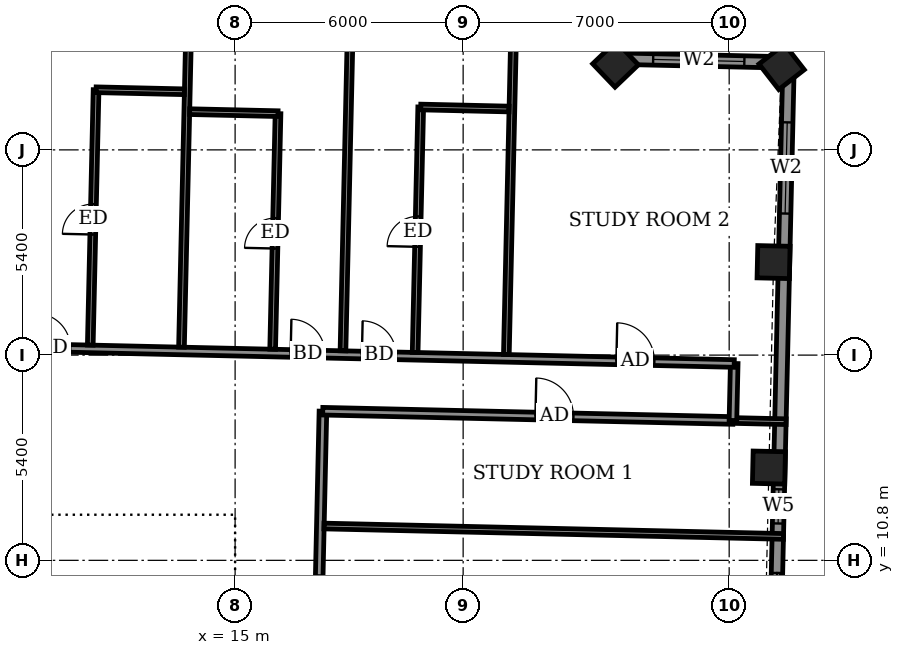
"""IFC4 building model, lengths in metres.
Left out: names, types, materials, properties, quantities, classifications, styles, units other than length and angle.
Written with IfcOpenShell. Run it as: python <this file> out.ifc"""

import sys

from ifc_helpers import new_model, si_unit, direction, frame, frame_2d, origin, origin_2d, place, context, subcontext, project, spatial, rectangle, extrude, element, fill, save


model = new_model("IFC4")
c1 = context("Model", 3, precision=1e-05, world=origin(), true_north=direction((0.0, 1.0)))
c2 = subcontext(c1, "Body", "Model", "MODEL_VIEW")
j1 = project(units=[si_unit("LENGTHUNIT", "METRE"), si_unit("PLANEANGLEUNIT", "RADIAN")], contexts=[c1])
p1 = place(None, origin())
s1 = spatial("IfcSite", under=j1, at=p1, CompositionType="ELEMENT")
p2 = place(p1, origin())
s2 = spatial("IfcBuilding", under=s1, at=p2, CompositionType="ELEMENT")
p3 = place(p2, frame((0.0, 0.0, 316.9)))
s3 = spatial("IfcBuildingStorey", under=s2, at=p3, CompositionType="ELEMENT", Elevation=316.9)
for number, where, z_axis, x_axis in (
    (1, (29.046, 13.242, -0.55), (0.0, 0.0, 1.0), (0.023, 1.0, 0.0)),
    (2, (29.168, 18.648, -0.55), (0.0, 0.0, 1.0), (0.023, 1.0, 0.0)),
    (3, (29.38, 23.784, -0.55), (0.0, 0.0, 1.0), (-0.613, 0.79, 0.0)),
    (4, (25.01, 23.851, -0.55), (0.0, 0.0, 1.0), (-0.691, 0.723, 0.0)),
):
    element("IfcColumn", number, at=place(p3, frame(where, z_axis=z_axis, x_axis=x_axis)), inside=s3, PredefinedType="COLUMN", context=c2, shape_type="SweptSolid", body=[
        extrude(rectangle(XDim=0.85, YDim=0.85, at=origin_2d()), origin(), (0.0, 0.0, 1.0), 3.6),
    ])
p4 = place(p3, frame((29.188, 7.404, 0.0), z_axis=(0.0, 0.0, 1.0), x_axis=(0.022728463996, 0.999741675096, 0.0)))
e5 = element("IfcWall", 5, at=p4, inside=s3, PredefinedType="SOLIDWALL", context=c2, shape_type="SweptSolid", body=[
    extrude(rectangle(XDim=16.499, YDim=0.3, at=frame_2d((8.25, 0.0))), origin(), (0.0, 0.0, 1.0), 2.55),
])
p5 = place(p4, frame((1.563, 0.0, 0.0)))
e6 = element("IfcOpeningElement", 6, at=p5, cuts=e5, PredefinedType="OPENING", context=c2, shape_type="SweptSolid", body=[
    extrude(rectangle(XDim=1.5, YDim=2.4, at=frame_2d((0.75, 1.2))), frame((0.0, 0.16, 0.0), z_axis=(0.0, -1.0, 0.0), x_axis=(1.0, 0.0, 0.0)), (0.0, 0.0, 1.0), 0.32),
])
p6 = place(p4, frame((4.367, 0.0, 0.9)))
e7 = element("IfcOpeningElement", 7, at=p6, cuts=e5, PredefinedType="OPENING", context=c2, shape_type="SweptSolid", body=[
    extrude(rectangle(XDim=0.9, YDim=1.5, at=frame_2d((0.45, 0.75))), frame((0.0, 0.16, 0.0), z_axis=(0.0, -1.0, 0.0), x_axis=(1.0, 0.0, 0.0)), (0.0, 0.0, 1.0), 0.32),
])
p7 = place(p4, frame((12.524, 0.0, 0.9)))
e8 = element("IfcOpeningElement", 8, at=p7, cuts=e5, PredefinedType="OPENING", context=c2, shape_type="SweptSolid", body=[
    extrude(rectangle(XDim=2.4, YDim=1.5, at=frame_2d((1.2, 0.75))), frame((0.0, 0.16, 0.0), z_axis=(0.0, -1.0, 0.0), x_axis=(1.0, 0.0, 0.0)), (0.0, 0.0, 1.0), 0.32),
])
p8 = place(p3, frame((29.563, 23.899, 0.0), z_axis=(0.0, 0.0, 1.0), x_axis=(-0.999741204967, 0.022749133868, 0.0)))
e9 = element("IfcWall", 9, at=p8, inside=s3, PredefinedType="SOLIDWALL", context=c2, shape_type="SweptSolid", body=[
    extrude(rectangle(XDim=4.4, YDim=0.3, at=frame_2d((2.2, 0.0))), origin(), (0.0, 0.0, 1.0), 2.55),
])
p9 = place(p8, frame((1.164, 0.0, 0.9)))
e10 = element("IfcOpeningElement", 10, at=p9, cuts=e9, PredefinedType="OPENING", context=c2, shape_type="SweptSolid", body=[
    extrude(rectangle(XDim=2.4, YDim=1.5, at=frame_2d((1.2, 0.75))), frame((0.0, 0.16, 0.0), z_axis=(0.0, -1.0, 0.0), x_axis=(1.0, 0.0, 0.0)), (0.0, 0.0, 1.0), 0.32),
])
p10 = place(p3, frame((25.164, 23.999, 0.0), z_axis=(0.0, 0.0, 1.0), x_axis=(0.02269871331, 0.999742351016, 0.0)))
e11 = element("IfcWall", 11, at=p10, inside=s3, PredefinedType="SOLIDWALL", context=c2, shape_type="SweptSolid", body=[
    extrude(rectangle(XDim=4.399, YDim=0.3, at=frame_2d((2.2, 0.0))), origin(), (0.0, 0.0, 1.0), 2.55),
])
p11 = place(p10, frame((0.826, 0.0, 0.9)))
e12 = element("IfcOpeningElement", 12, at=p11, cuts=e11, PredefinedType="OPENING", context=c2, shape_type="SweptSolid", body=[
    extrude(rectangle(XDim=2.4, YDim=1.5, at=frame_2d((1.2, 0.75))), frame((0.0, 0.16, 0.0), z_axis=(0.0, -1.0, 0.0), x_axis=(1.0, 0.0, 0.0)), (0.0, 0.0, 1.0), 0.32),
])
p12 = place(p3, frame((17.157, 7.898, 0.0), z_axis=(0.0, 0.0, 1.0), x_axis=(0.022562209343, 0.999745440955, 0.0)))
e13 = element("IfcWall", 13, at=p12, inside=s3, PredefinedType="PARTITIONING", context=c2, shape_type="SweptSolid", body=[
    extrude(rectangle(XDim=6.828, YDim=0.2, at=frame_2d((3.414, 0.0))), origin(), (0.0, 0.0, 1.0), 3.05),
])
p13 = place(p12, frame((1.504, 0.0, 0.0)))
e14 = element("IfcOpeningElement", 14, at=p13, cuts=e13, PredefinedType="OPENING", context=c2, shape_type="SweptSolid", body=[
    extrude(rectangle(XDim=1.0, YDim=2.1, at=frame_2d((0.5, 1.05))), frame((0.0, 0.11, 0.0), z_axis=(0.0, -1.0, 0.0), x_axis=(1.0, 0.0, 0.0)), (0.0, 0.0, 1.0), 0.22),
])
p14 = place(p3, frame((17.338, 11.703, 0.0), z_axis=(0.0, 0.0, 1.0), x_axis=(0.999743510562, -0.022647584624, 0.0)))
e15 = element("IfcWall", 15, at=p14, inside=s3, PredefinedType="PARTITIONING", context=c2, shape_type="SweptSolid", body=[
    extrude(rectangle(XDim=12.095, YDim=0.15, at=frame_2d((6.048, 0.0))), origin(), (0.0, 0.0, 1.0), 2.55),
])
p15 = place(p3, frame((17.306, 14.724, 0.0), z_axis=(0.0, 0.0, 1.0), x_axis=(0.999744269809, -0.022614043969, 0.0)))
e16 = element("IfcWall", 16, at=p15, inside=s3, PredefinedType="PARTITIONING", context=c2, shape_type="SweptSolid", body=[
    extrude(rectangle(XDim=10.796, YDim=0.2, at=frame_2d((5.398, 0.0))), origin(), (0.0, 0.0, 1.0), 3.05),
])
p16 = place(p15, frame((5.598, 0.0, 0.0)))
e17 = element("IfcOpeningElement", 17, at=p16, cuts=e16, PredefinedType="OPENING", context=c2, shape_type="SweptSolid", body=[
    extrude(rectangle(XDim=1.0, YDim=2.1, at=frame_2d((0.5, 1.05))), frame((0.0, 0.11, 0.0), z_axis=(0.0, -1.0, 0.0), x_axis=(1.0, 0.0, 0.0)), (0.0, 0.0, 1.0), 0.22),
])
p17 = place(p3, frame((28.099, 14.48, 0.0), z_axis=(0.0, 0.0, 1.0), x_axis=(0.999738763928, -0.022856156732, 0.0)))
e18 = element("IfcWall", 18, at=p17, inside=s3, PredefinedType="PARTITIONING", context=c2, shape_type="SweptSolid", body=[
    extrude(rectangle(XDim=1.399, YDim=0.15, at=frame_2d((0.7, 0.0))), origin(), (0.0, 0.0, 1.0), 2.55),
])
p18 = place(p3, frame((28.099, 14.48, 0.0), z_axis=(0.0, 0.0, 1.0), x_axis=(0.022632637625, 0.99974384905, 0.0)))
e19 = element("IfcWall", 19, at=p18, inside=s3, PredefinedType="PARTITIONING", context=c2, shape_type="SweptSolid", body=[
    extrude(rectangle(XDim=1.5, YDim=0.2, at=frame_2d((0.75, 0.0))), origin(), (0.0, 0.0, 1.0), 3.05),
])
p19 = place(p3, frame((-30.652, 17.313, 0.0), z_axis=(0.0, 0.0, 1.0), x_axis=(0.999742623764, -0.02268669719, 0.0)))
e20 = element("IfcWall", 20, at=p19, inside=s3, PredefinedType="PARTITIONING", context=c2, shape_type="SweptSolid", body=[
    extrude(rectangle(XDim=58.8, YDim=0.2, at=frame_2d((29.4, 0.0))), origin(), (0.0, 0.0, 1.0), 3.05),
])
p20 = place(p19, frame((55.698, 0.0, 0.0)))
e21 = element("IfcOpeningElement", 21, at=p20, cuts=e20, PredefinedType="OPENING", context=c2, shape_type="SweptSolid", body=[
    extrude(rectangle(XDim=1.0, YDim=2.1, at=frame_2d((0.5, 1.05))), frame((0.0, 0.11, 0.0), z_axis=(0.0, -1.0, 0.0), x_axis=(1.0, 0.0, 0.0)), (0.0, 0.0, 1.0), 0.22),
])
p21 = place(p19, frame((49.0, 0.0, 0.0)))
e22 = element("IfcOpeningElement", 22, at=p21, cuts=e20, PredefinedType="OPENING", context=c2, shape_type="SweptSolid", body=[
    extrude(rectangle(XDim=0.9, YDim=2.1, at=frame_2d((0.45, 1.05))), frame((0.0, 0.11, 0.0), z_axis=(0.0, -1.0, 0.0), x_axis=(1.0, 0.0, 0.0)), (0.0, 0.0, 1.0), 0.22),
])
p22 = place(p19, frame((47.125, 0.0, 0.0)))
e23 = element("IfcOpeningElement", 23, at=p22, cuts=e20, PredefinedType="OPENING", context=c2, shape_type="SweptSolid", body=[
    extrude(rectangle(XDim=0.9, YDim=2.1, at=frame_2d((0.45, 1.05))), frame((0.0, 0.11, 0.0), z_axis=(0.0, -1.0, 0.0), x_axis=(1.0, 0.0, 0.0)), (0.0, 0.0, 1.0), 0.22),
])
p23 = place(p19, frame((40.425, 0.0, 0.0)))
e24 = element("IfcOpeningElement", 24, at=p23, cuts=e20, PredefinedType="OPENING", context=c2, shape_type="SweptSolid", body=[
    extrude(rectangle(XDim=0.9, YDim=2.1, at=frame_2d((0.45, 1.05))), frame((0.0, 0.11, 0.0), z_axis=(0.0, -1.0, 0.0), x_axis=(1.0, 0.0, 0.0)), (0.0, 0.0, 1.0), 0.22),
])
p24 = place(p19, frame((38.4, 0.0, 0.0)))
e25 = element("IfcOpeningElement", 25, at=p24, cuts=e20, PredefinedType="OPENING", context=c2, shape_type="SweptSolid", body=[
    extrude(rectangle(XDim=0.9, YDim=2.1, at=frame_2d((0.45, 1.05))), frame((0.0, 0.11, 0.0), z_axis=(0.0, -1.0, 0.0), x_axis=(1.0, 0.0, 0.0)), (0.0, 0.0, 1.0), 0.22),
])
p25 = place(p19, frame((31.6, 0.0, 0.0)))
e26 = element("IfcOpeningElement", 26, at=p25, cuts=e20, PredefinedType="OPENING", context=c2, shape_type="SweptSolid", body=[
    extrude(rectangle(XDim=0.9, YDim=2.1, at=frame_2d((0.45, 1.05))), frame((0.0, 0.11, 0.0), z_axis=(0.0, -1.0, 0.0), x_axis=(1.0, 0.0, 0.0)), (0.0, 0.0, 1.0), 0.22),
])
p26 = place(p19, frame((29.55, 0.0, 0.0)))
e27 = element("IfcOpeningElement", 27, at=p26, cuts=e20, PredefinedType="OPENING", context=c2, shape_type="SweptSolid", body=[
    extrude(rectangle(XDim=0.9, YDim=2.1, at=frame_2d((0.45, 1.05))), frame((0.0, 0.11, 0.0), z_axis=(0.0, -1.0, 0.0), x_axis=(1.0, 0.0, 0.0)), (0.0, 0.0, 1.0), 0.22),
])
p27 = place(p19, frame((22.625, 0.0, 0.0)))
e28 = element("IfcOpeningElement", 28, at=p27, cuts=e20, PredefinedType="OPENING", context=c2, shape_type="SweptSolid", body=[
    extrude(rectangle(XDim=0.9, YDim=2.1, at=frame_2d((0.45, 1.05))), frame((0.0, 0.11, 0.0), z_axis=(0.0, -1.0, 0.0), x_axis=(1.0, 0.0, 0.0)), (0.0, 0.0, 1.0), 0.22),
])
p28 = place(p19, frame((20.625, 0.0, 0.0)))
e29 = element("IfcOpeningElement", 29, at=p28, cuts=e20, PredefinedType="OPENING", context=c2, shape_type="SweptSolid", body=[
    extrude(rectangle(XDim=0.9, YDim=2.1, at=frame_2d((0.45, 1.05))), frame((0.0, 0.11, 0.0), z_axis=(0.0, -1.0, 0.0), x_axis=(1.0, 0.0, 0.0)), (0.0, 0.0, 1.0), 0.22),
])
p29 = place(p19, frame((13.825, 0.0, 0.0)))
e30 = element("IfcOpeningElement", 30, at=p29, cuts=e20, PredefinedType="OPENING", context=c2, shape_type="SweptSolid", body=[
    extrude(rectangle(XDim=0.9, YDim=2.1, at=frame_2d((0.45, 1.05))), frame((0.0, 0.11, 0.0), z_axis=(0.0, -1.0, 0.0), x_axis=(1.0, 0.0, 0.0)), (0.0, 0.0, 1.0), 0.22),
])
p30 = place(p19, frame((11.725, 0.0, 0.0)))
e31 = element("IfcOpeningElement", 31, at=p30, cuts=e20, PredefinedType="OPENING", context=c2, shape_type="SweptSolid", body=[
    extrude(rectangle(XDim=0.9, YDim=2.1, at=frame_2d((0.45, 1.05))), frame((0.0, 0.11, 0.0), z_axis=(0.0, -1.0, 0.0), x_axis=(1.0, 0.0, 0.0)), (0.0, 0.0, 1.0), 0.22),
])
p31 = place(p19, frame((1.85, 0.0, 0.0)))
e32 = element("IfcOpeningElement", 32, at=p31, cuts=e20, PredefinedType="OPENING", context=c2, shape_type="SweptSolid", body=[
    extrude(rectangle(XDim=1.0, YDim=2.1, at=frame_2d((0.5, 1.05))), frame((0.0, 0.11, 0.0), z_axis=(0.0, -1.0, 0.0), x_axis=(1.0, 0.0, 0.0)), (0.0, 0.0, 1.0), 0.22),
])
p32 = place(p19, frame((6.95, 0.0, 0.0)))
e33 = element("IfcOpeningElement", 33, at=p32, cuts=e20, PredefinedType="OPENING", context=c2, shape_type="SweptSolid", body=[
    extrude(rectangle(XDim=0.9, YDim=2.1, at=frame_2d((0.45, 1.05))), frame((0.0, 0.11, 0.0), z_axis=(0.0, -1.0, 0.0), x_axis=(1.0, 0.0, 0.0)), (0.0, 0.0, 1.0), 0.22),
])
p33 = place(p3, frame((11.189, 16.464, 0.0), z_axis=(0.0, 0.0, 1.0), x_axis=(0.022780828718, 0.999740483247, 0.0)))
e34 = element("IfcWall", 34, at=p33, inside=s3, PredefinedType="PARTITIONING", context=c2, shape_type="SweptSolid", body=[
    extrude(rectangle(XDim=6.719, YDim=0.15, at=frame_2d((3.36, 0.0))), origin(), (0.0, 0.0, 1.0), 3.05),
])
p34 = place(p33, frame((2.91, 0.0, 0.0)))
e35 = element("IfcOpeningElement", 35, at=p34, cuts=e34, PredefinedType="OPENING", context=c2, shape_type="SweptSolid", body=[
    extrude(rectangle(XDim=0.8, YDim=2.1, at=frame_2d((0.4, 1.05))), frame((0.0, 0.085, 0.0), z_axis=(0.0, -1.0, 0.0), x_axis=(1.0, 0.0, 0.0)), (0.0, 0.0, 1.0), 0.17),
])
p35 = place(p3, frame((13.589, 16.409, 0.0), z_axis=(0.0, 0.0, 1.0), x_axis=(0.022661475803, 0.999743195783, 0.0)))
e36 = element("IfcWall", 36, at=p35, inside=s3, PredefinedType="PARTITIONING", context=c2, shape_type="SweptSolid", body=[
    extrude(rectangle(XDim=12.4, YDim=0.15, at=frame_2d((6.2, 0.0))), origin(), (0.0, 0.0, 1.0), 2.45),
])
p36 = place(p3, frame((15.988, 16.355, 0.0), z_axis=(0.0, 0.0, 1.0), x_axis=(0.022722299893, 0.999741815214, 0.0)))
e37 = element("IfcWall", 37, at=p36, inside=s3, PredefinedType="PARTITIONING", context=c2, shape_type="SweptSolid", body=[
    extrude(rectangle(XDim=6.2, YDim=0.15, at=frame_2d((3.1, 0.0))), origin(), (0.0, 0.0, 1.0), 3.05),
])
p37 = place(p36, frame((2.65, 0.0, 0.0)))
e38 = element("IfcOpeningElement", 38, at=p37, cuts=e37, PredefinedType="OPENING", context=c2, shape_type="SweptSolid", body=[
    extrude(rectangle(XDim=0.8, YDim=2.1, at=frame_2d((0.4, 1.05))), frame((0.0, 0.085, 0.0), z_axis=(0.0, -1.0, 0.0), x_axis=(1.0, 0.0, 0.0)), (0.0, 0.0, 1.0), 0.17),
])
p38 = place(p3, frame((17.838, 16.313, 0.0), z_axis=(0.0, 0.0, 1.0), x_axis=(0.022661475803, 0.999743195783, 0.0)))
e39 = element("IfcWall", 39, at=p38, inside=s3, PredefinedType="PARTITIONING", context=c2, shape_type="SweptSolid", body=[
    extrude(rectangle(XDim=12.4, YDim=0.15, at=frame_2d((6.2, 0.0))), origin(), (0.0, 0.0, 1.0), 3.05),
])
p39 = place(p3, frame((19.737, 16.27, 0.0), z_axis=(0.0, 0.0, 1.0), x_axis=(0.022752312182, 0.999741132639, 0.0)))
e40 = element("IfcWall", 40, at=p39, inside=s3, PredefinedType="PARTITIONING", context=c2, shape_type="SweptSolid", body=[
    extrude(rectangle(XDim=6.46, YDim=0.15, at=frame_2d((3.23, 0.0))), origin(), (0.0, 0.0, 1.0), 3.05),
])
p40 = place(p39, frame((2.78, 0.0, 0.0)))
e41 = element("IfcOpeningElement", 41, at=p40, cuts=e40, PredefinedType="OPENING", context=c2, shape_type="SweptSolid", body=[
    extrude(rectangle(XDim=0.8, YDim=2.1, at=frame_2d((0.4, 1.05))), frame((0.0, 0.085, 0.0), z_axis=(0.0, -1.0, 0.0), x_axis=(1.0, 0.0, 0.0)), (0.0, 0.0, 1.0), 0.17),
])
p41 = place(p3, frame((22.137, 16.215, 0.0), z_axis=(0.0, 0.0, 1.0), x_axis=(0.022661475803, 0.999743195783, 0.0)))
e42 = element("IfcWall", 42, at=p41, inside=s3, PredefinedType="PARTITIONING", context=c2, shape_type="SweptSolid", body=[
    extrude(rectangle(XDim=12.4, YDim=0.15, at=frame_2d((6.2, 0.0))), origin(), (0.0, 0.0, 1.0), 2.5),
])
p42 = place(p3, frame((13.804, 22.606, 0.0), z_axis=(0.0, 0.0, 1.0), x_axis=(0.999740478815, -0.022781023197, 0.0)))
e43 = element("IfcWall", 43, at=p42, inside=s3, PredefinedType="PARTITIONING", context=c2, shape_type="SweptSolid", body=[
    extrude(rectangle(XDim=2.325, YDim=0.15, at=frame_2d((1.163, 0.0))), origin(), (0.0, 0.0, 1.0), 3.05),
])
for number, where, z_axis, x_axis in (
    (44, (19.884, 22.728, 0.0), (0.0, 0.0, 1.0), (1.0, -0.023, 0.0)),
    (45, (11.342, 23.182, 0.0), (0.0, 0.0, 1.0), (1.0, -0.023, 0.0)),
):
    element("IfcWall", number, at=place(p3, frame(where, z_axis=z_axis, x_axis=x_axis)), inside=s3, PredefinedType="PARTITIONING", context=c2, shape_type="SweptSolid", body=[
        extrude(rectangle(XDim=2.324, YDim=0.15, at=frame_2d((1.162, 0.0))), origin(), (0.0, 0.0, 1.0), 3.05),
    ])
p43 = place(p3, frame((-14.4, 11.1, 0.0), z_axis=(0.0, 0.0, 1.0), x_axis=(1.0, 0.0, 0.0)))
e46 = element("IfcWall", 46, at=p43, inside=s3, PredefinedType="SHEAR", context=c2, shape_type="SweptSolid", body=[
    extrude(rectangle(XDim=28.8, YDim=0.6, at=frame_2d((14.4, 0.0))), origin(), (0.0, 0.0, 1.0), 3.6),
])
p44 = place(p3, frame((14.1, -10.8, 0.0), z_axis=(0.0, 0.0, 1.0), x_axis=(0.0, 1.0, 0.0)))
e47 = element("IfcWall", 47, at=p44, inside=s3, PredefinedType="SHEAR", context=c2, shape_type="SweptSolid", body=[
    extrude(rectangle(XDim=21.6, YDim=0.6, at=frame_2d((10.8, 0.0))), origin(), (0.0, 0.0, 1.0), 3.6),
])
p45 = place(p44, frame((1.2, 0.0, 0.0)))
e48 = element("IfcOpeningElement", 48, at=p45, cuts=e47, PredefinedType="OPENING", context=c2, shape_type="SweptSolid", body=[
    extrude(rectangle(XDim=1.2, YDim=2.1, at=frame_2d((0.6, 1.05))), frame((0.0, 0.31, 0.0), z_axis=(0.0, -1.0, 0.0), x_axis=(1.0, 0.0, 0.0)), (0.0, 0.0, 1.0), 0.62),
])
p46 = place(p3, frame((10.8, 8.2, 0.0), z_axis=(0.0, 0.0, 1.0), x_axis=(0.0, 1.0, 0.0)))
e49 = element("IfcWall", 49, at=p46, inside=s3, PredefinedType="STANDARD", context=c2, shape_type="SweptSolid", body=[
    extrude(rectangle(XDim=2.6, YDim=0.2, at=frame_2d((1.3, 0.0))), origin(), (0.0, 0.0, 1.0), 3.05),
])
p47 = place(p5, origin())
e50 = element("IfcDoor", 50, at=p47, inside=s3, OperationType="SLIDING_TO_LEFT", PredefinedType="DOOR", context=c2, shape_type="SweptSolid", body=[
    extrude(rectangle(XDim=1.5, YDim=2.4, at=frame_2d((0.75, 1.2))), frame((0.0, 0.025, 0.0), z_axis=(0.0, -1.0, 0.0), x_axis=(1.0, 0.0, 0.0)), (0.0, 0.0, 1.0), 0.05),
])
fill(e6, e50)
p48 = place(p6, origin())
e51 = element("IfcWindow", 51, at=p48, inside=s3, PartitioningType="SINGLE_PANEL", PredefinedType="WINDOW", context=c2, shape_type="SweptSolid", body=[
    extrude(rectangle(XDim=0.9, YDim=1.5, at=frame_2d((0.45, 0.75))), frame((0.0, 0.03, 0.0), z_axis=(0.0, -1.0, 0.0), x_axis=(1.0, 0.0, 0.0)), (0.0, 0.0, 1.0), 0.06),
])
fill(e7, e51)
p49 = place(p7, origin())
e52 = element("IfcWindow", 52, at=p49, inside=s3, PartitioningType="DOUBLE_PANEL_VERTICAL", PredefinedType="WINDOW", context=c2, shape_type="SweptSolid", body=[
    extrude(rectangle(XDim=2.4, YDim=1.5, at=frame_2d((1.2, 0.75))), frame((0.0, 0.03, 0.0), z_axis=(0.0, -1.0, 0.0), x_axis=(1.0, 0.0, 0.0)), (0.0, 0.0, 1.0), 0.06),
])
fill(e8, e52)
p50 = place(p9, origin())
e53 = element("IfcWindow", 53, at=p50, inside=s3, PartitioningType="DOUBLE_PANEL_VERTICAL", PredefinedType="WINDOW", context=c2, shape_type="SweptSolid", body=[
    extrude(rectangle(XDim=2.4, YDim=1.5, at=frame_2d((1.2, 0.75))), frame((0.0, 0.03, 0.0), z_axis=(0.0, -1.0, 0.0), x_axis=(1.0, 0.0, 0.0)), (0.0, 0.0, 1.0), 0.06),
])
fill(e10, e53)
p51 = place(p16, origin())
e54 = element("IfcDoor", 54, at=p51, inside=s3, OperationType="SINGLE_SWING_RIGHT", PredefinedType="DOOR", context=c2, shape_type="SweptSolid", body=[
    extrude(rectangle(XDim=1.0, YDim=2.1, at=frame_2d((0.5, 1.05))), frame((0.0, 0.025, 0.0), z_axis=(0.0, -1.0, 0.0), x_axis=(1.0, 0.0, 0.0)), (0.0, 0.0, 1.0), 0.05),
])
fill(e17, e54)
p52 = place(p20, origin())
e55 = element("IfcDoor", 55, at=p52, inside=s3, OperationType="SINGLE_SWING_LEFT", PredefinedType="DOOR", context=c2, shape_type="SweptSolid", body=[
    extrude(rectangle(XDim=1.0, YDim=2.1, at=frame_2d((0.5, 1.05))), frame((0.0, 0.025, 0.0), z_axis=(0.0, -1.0, 0.0), x_axis=(1.0, 0.0, 0.0)), (0.0, 0.0, 1.0), 0.05),
])
fill(e21, e55)
p53 = place(p21, origin())
e56 = element("IfcDoor", 56, at=p53, inside=s3, OperationType="SINGLE_SWING_LEFT", PredefinedType="DOOR", context=c2, shape_type="SweptSolid", body=[
    extrude(rectangle(XDim=0.9, YDim=2.1, at=frame_2d((0.45, 1.05))), frame((0.0, 0.025, 0.0), z_axis=(0.0, -1.0, 0.0), x_axis=(1.0, 0.0, 0.0)), (0.0, 0.0, 1.0), 0.05),
])
fill(e22, e56)
p54 = place(p40, origin())
e57 = element("IfcDoor", 57, at=p54, inside=s3, OperationType="SINGLE_SWING_LEFT", PredefinedType="DOOR", context=c2, shape_type="SweptSolid", body=[
    extrude(rectangle(XDim=0.8, YDim=2.1, at=frame_2d((0.4, 1.05))), frame((0.0, 0.025, 0.0), z_axis=(0.0, -1.0, 0.0), x_axis=(1.0, 0.0, 0.0)), (0.0, 0.0, 1.0), 0.05),
])
fill(e41, e57)
p55 = place(p22, origin())
e58 = element("IfcDoor", 58, at=p55, inside=s3, OperationType="SINGLE_SWING_RIGHT", PredefinedType="DOOR", context=c2, shape_type="SweptSolid", body=[
    extrude(rectangle(XDim=0.9, YDim=2.1, at=frame_2d((0.45, 1.05))), frame((0.0, 0.025, 0.0), z_axis=(0.0, -1.0, 0.0), x_axis=(1.0, 0.0, 0.0)), (0.0, 0.0, 1.0), 0.05),
])
fill(e23, e58)
p56 = place(p37, origin())
e59 = element("IfcDoor", 59, at=p56, inside=s3, OperationType="SINGLE_SWING_RIGHT", PredefinedType="DOOR", context=c2, shape_type="SweptSolid", body=[
    extrude(rectangle(XDim=0.8, YDim=2.1, at=frame_2d((0.4, 1.05))), frame((0.0, 0.025, 0.0), z_axis=(0.0, -1.0, 0.0), x_axis=(1.0, 0.0, 0.0)), (0.0, 0.0, 1.0), 0.05),
])
fill(e38, e59)
p57 = place(p23, origin())
e60 = element("IfcDoor", 60, at=p57, inside=s3, OperationType="SINGLE_SWING_LEFT", PredefinedType="DOOR", context=c2, shape_type="SweptSolid", body=[
    extrude(rectangle(XDim=0.9, YDim=2.1, at=frame_2d((0.45, 1.05))), frame((0.0, 0.025, 0.0), z_axis=(0.0, -1.0, 0.0), x_axis=(1.0, 0.0, 0.0)), (0.0, 0.0, 1.0), 0.05),
])
fill(e24, e60)
p58 = place(p34, origin())
e61 = element("IfcDoor", 61, at=p58, inside=s3, OperationType="SINGLE_SWING_LEFT", PredefinedType="DOOR", context=c2, shape_type="SweptSolid", body=[
    extrude(rectangle(XDim=0.8, YDim=2.1, at=frame_2d((0.4, 1.05))), frame((0.0, 0.025, 0.0), z_axis=(0.0, -1.0, 0.0), x_axis=(1.0, 0.0, 0.0)), (0.0, 0.0, 1.0), 0.05),
])
fill(e35, e61)
save(model, sys.argv[1])
